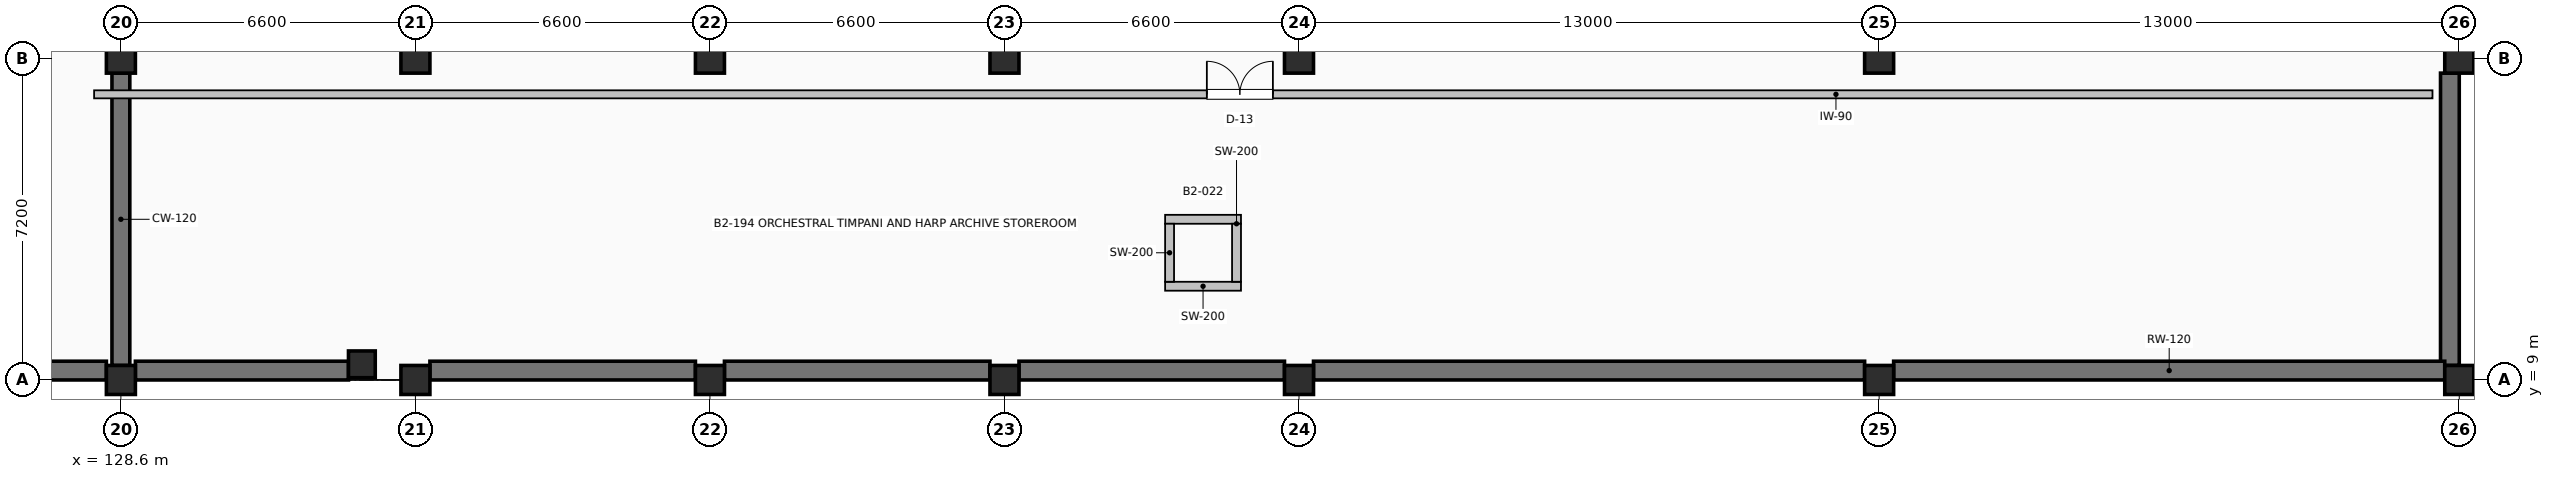
"""IFC4 building model, lengths in metres.
Left out: names, types, materials, properties, quantities, classifications, styles, units other than length and angle.
Written with IfcOpenShell. Run it as: python <this file> out.ifc"""

import sys

from ifc_helpers import new_model, si_unit, direction, frame, frame_2d, origin, origin_2d, place, context, subcontext, project, spatial, rectangle, extrude, element, fill, save


model = new_model("IFC4")
c1 = context("Model", 3, precision=1e-05, world=origin(), true_north=direction((0.0, 1.0)))
c2 = subcontext(c1, "Body", "Model", "MODEL_VIEW")
j1 = project(units=[si_unit("LENGTHUNIT", "METRE"), si_unit("PLANEANGLEUNIT", "RADIAN")], contexts=[c1])
p1 = place(None, origin())
s1 = spatial("IfcSite", under=j1, at=p1, CompositionType="ELEMENT")
p2 = place(p1, origin())
s2 = spatial("IfcBuilding", under=s1, at=p2, CompositionType="ELEMENT")
p3 = place(p2, frame((0.0, 0.0, -9.6)))
s3 = spatial("IfcBuildingStorey", under=s2, at=p3, CompositionType="ELEMENT", Elevation=-9.6)
for number, where, z_axis, x_axis in (
    (1, (128.6, 9.0, 0.0), (0.0, 0.0, 1.0), (1.0, 0.0, 0.0)),
    (2, (128.6, 16.2, 0.0), (0.0, 0.0, 1.0), (1.0, 0.0, 0.0)),
    (3, (135.2, 9.0, 0.0), (0.0, 0.0, 1.0), (1.0, 0.0, 0.0)),
    (4, (135.2, 16.2, 0.0), (0.0, 0.0, 1.0), (1.0, 0.0, 0.0)),
    (5, (141.8, 9.0, 0.0), (0.0, 0.0, 1.0), (1.0, 0.0, 0.0)),
    (6, (141.8, 16.2, 0.0), (0.0, 0.0, 1.0), (1.0, 0.0, 0.0)),
    (7, (148.4, 9.0, 0.0), (0.0, 0.0, 1.0), (1.0, 0.0, 0.0)),
    (8, (148.4, 16.2, 0.0), (0.0, 0.0, 1.0), (1.0, 0.0, 0.0)),
    (9, (155.0, 9.0, 0.0), (0.0, 0.0, 1.0), (1.0, 0.0, 0.0)),
    (10, (155.0, 16.2, 0.0), (0.0, 0.0, 1.0), (1.0, 0.0, 0.0)),
    (11, (168.0, 9.0, 0.0), (0.0, 0.0, 1.0), (1.0, 0.0, 0.0)),
    (12, (168.0, 16.2, 0.0), (0.0, 0.0, 1.0), (1.0, 0.0, 0.0)),
    (13, (181.0, 9.0, 0.0), (0.0, 0.0, 1.0), (1.0, 0.0, 0.0)),
    (14, (181.0, 16.2, 0.0), (0.0, 0.0, 1.0), (1.0, 0.0, 0.0)),
):
    element("IfcColumn", number, at=place(p3, frame(where, z_axis=z_axis, x_axis=x_axis)), inside=s3, PredefinedType="COLUMN", context=c2, shape_type="SweptSolid", body=[
        extrude(rectangle(XDim=0.65, YDim=0.65, at=origin_2d()), origin(), (0.0, 0.0, 1.0), 4.8),
    ])
p4 = place(p3, frame((134.0, 9.35, 0.0), z_axis=(0.0, 0.0, 1.0), x_axis=(1.0, 0.0, 0.0)))
e15 = element("IfcColumn", 15, at=p4, inside=s3, PredefinedType="COLUMN", context=c2, shape_type="SweptSolid", body=[
    extrude(rectangle(XDim=0.6, YDim=0.6, at=origin_2d()), origin(), (0.0, 0.0, 1.0), 4.8),
])
p5 = place(p3, frame((128.6, 9.325, 0.0), z_axis=(0.0, 0.0, 1.0), x_axis=(0.0, 1.0, 0.0)))
e16 = element("IfcWall", 16, at=p5, inside=s3, PredefinedType="SHEAR", context=c2, shape_type="SweptSolid", body=[
    extrude(rectangle(XDim=6.55, YDim=0.4, at=frame_2d((3.275, 0.0))), origin(), (0.0, 0.0, 1.0), 4.5),
])
p6 = place(p3, frame((180.79, 15.875, 0.0), z_axis=(0.0, 0.0, 1.0), x_axis=(0.0, -1.0, 0.0)))
e17 = element("IfcWall", 17, at=p6, inside=s3, PredefinedType="SHEAR", context=c2, shape_type="SweptSolid", body=[
    extrude(rectangle(XDim=6.55, YDim=0.42, at=frame_2d((3.275, 0.0))), origin(), (0.0, 0.0, 1.0), 4.5),
])
for number, where, z_axis, x_axis in (
    (18, (180.675, 9.21, 0.0), (0.0, 0.0, 1.0), (-1.0, 0.0, 0.0)),
    (19, (167.675, 9.21, 0.0), (0.0, 0.0, 1.0), (-1.0, 0.0, 0.0)),
):
    element("IfcWall", number, at=place(p3, frame(where, z_axis=z_axis, x_axis=x_axis)), inside=s3, PredefinedType="SHEAR", context=c2, shape_type="SweptSolid", body=[
        extrude(rectangle(XDim=12.35, YDim=0.42, at=frame_2d((6.175, 0.0))), origin(), (0.0, 0.0, 1.0), 4.5),
    ])
for number, where, z_axis, x_axis in (
    (20, (154.675, 9.21, 0.0), (0.0, 0.0, 1.0), (-1.0, 0.0, 0.0)),
    (21, (148.075, 9.21, 0.0), (0.0, 0.0, 1.0), (-1.0, 0.0, 0.0)),
):
    element("IfcWall", number, at=place(p3, frame(where, z_axis=z_axis, x_axis=x_axis)), inside=s3, PredefinedType="SHEAR", context=c2, shape_type="SweptSolid", body=[
        extrude(rectangle(XDim=5.95, YDim=0.42, at=frame_2d((2.975, 0.0))), origin(), (0.0, 0.0, 1.0), 4.5),
    ])
p7 = place(p3, frame((141.475, 9.21, 0.0), z_axis=(0.0, 0.0, 1.0), x_axis=(-1.0, 0.0, 0.0)))
e22 = element("IfcWall", 22, at=p7, inside=s3, PredefinedType="SHEAR", context=c2, shape_type="SweptSolid", body=[
    extrude(rectangle(XDim=5.95, YDim=0.42, at=frame_2d((2.975, 0.0))), origin(), (0.0, 0.0, 1.0), 4.5),
])
p8 = place(p3, frame((133.7, 9.21, 0.0), z_axis=(0.0, 0.0, 1.0), x_axis=(-1.0, 0.0, 0.0)))
e23 = element("IfcWall", 23, at=p8, inside=s3, PredefinedType="SHEAR", context=c2, shape_type="SweptSolid", body=[
    extrude(rectangle(XDim=4.775, YDim=0.42, at=frame_2d((2.387, 0.0))), origin(), (0.0, 0.0, 1.0), 4.5),
])
p9 = place(p3, frame((128.275, 9.21, 0.0), z_axis=(0.0, 0.0, 1.0), x_axis=(-1.0, 0.0, 0.0)))
e24 = element("IfcWall", 24, at=p9, inside=s3, PredefinedType="SHEAR", context=c2, shape_type="SweptSolid", body=[
    extrude(rectangle(XDim=5.95, YDim=0.42, at=frame_2d((2.975, 0.0))), origin(), (0.0, 0.0, 1.0), 4.5),
])
for number, where, z_axis, x_axis in (
    (25, (152.0, 11.1, 0.0), (0.0, 0.0, 1.0), (1.0, 0.0, 0.0)),
    (26, (153.7, 12.6, 0.0), (0.0, 0.0, 1.0), (-1.0, 0.0, 0.0)),
):
    element("IfcWall", number, at=place(p3, frame(where, z_axis=z_axis, x_axis=x_axis)), inside=s3, PredefinedType="PARTITIONING", context=c2, shape_type="SweptSolid", body=[
        extrude(rectangle(XDim=1.7, YDim=0.2, at=frame_2d((0.85, 0.0))), origin(), (0.0, 0.0, 1.0), 4.5),
    ])
for number, where, z_axis, x_axis in (
    (27, (152.1, 11.2, 0.0), (0.0, 0.0, 1.0), (0.0, 1.0, 0.0)),
    (28, (153.6, 12.5, 0.0), (0.0, 0.0, 1.0), (0.0, -1.0, 0.0)),
):
    element("IfcWall", number, at=place(p3, frame(where, z_axis=z_axis, x_axis=x_axis)), inside=s3, PredefinedType="PARTITIONING", context=c2, shape_type="SweptSolid", body=[
        extrude(rectangle(XDim=1.3, YDim=0.2, at=frame_2d((0.65, 0.0))), origin(), (0.0, 0.0, 1.0), 4.5),
    ])
p10 = place(p3, frame((128.0, 15.4, 0.0), z_axis=(0.0, 0.0, 1.0), x_axis=(1.0, 0.0, 0.0)))
e29 = element("IfcWall", 29, at=p10, inside=s3, PredefinedType="PARTITIONING", context=c2, shape_type="SweptSolid", body=[
    extrude(rectangle(XDim=52.4, YDim=0.18, at=frame_2d((26.2, 0.0))), origin(), (0.0, 0.0, 1.0), 4.492),
])
p11 = place(p10, frame((24.935, 0.0, 0.0)))
e30 = element("IfcOpeningElement", 30, at=p11, cuts=e29, PredefinedType="OPENING", context=c2, shape_type="SweptSolid", body=[
    extrude(rectangle(XDim=1.48, YDim=2.18, at=frame_2d((0.74, 1.09))), frame((0.0, 0.1, 0.0), z_axis=(0.0, -1.0, 0.0), x_axis=(1.0, 0.0, 0.0)), (0.0, 0.0, 1.0), 0.2),
])
p12 = place(p11, origin())
e31 = element("IfcDoor", 31, at=p12, inside=s3, OperationType="DOUBLE_DOOR_SINGLE_SWING", PredefinedType="DOOR", context=c2, shape_type="SweptSolid", body=[
    extrude(rectangle(XDim=1.48, YDim=2.18, at=frame_2d((0.74, 1.09))), frame((0.0, 0.025, 0.0), z_axis=(0.0, -1.0, 0.0), x_axis=(1.0, 0.0, 0.0)), (0.0, 0.0, 1.0), 0.05),
])
fill(e30, e31)
save(model, sys.argv[1])
